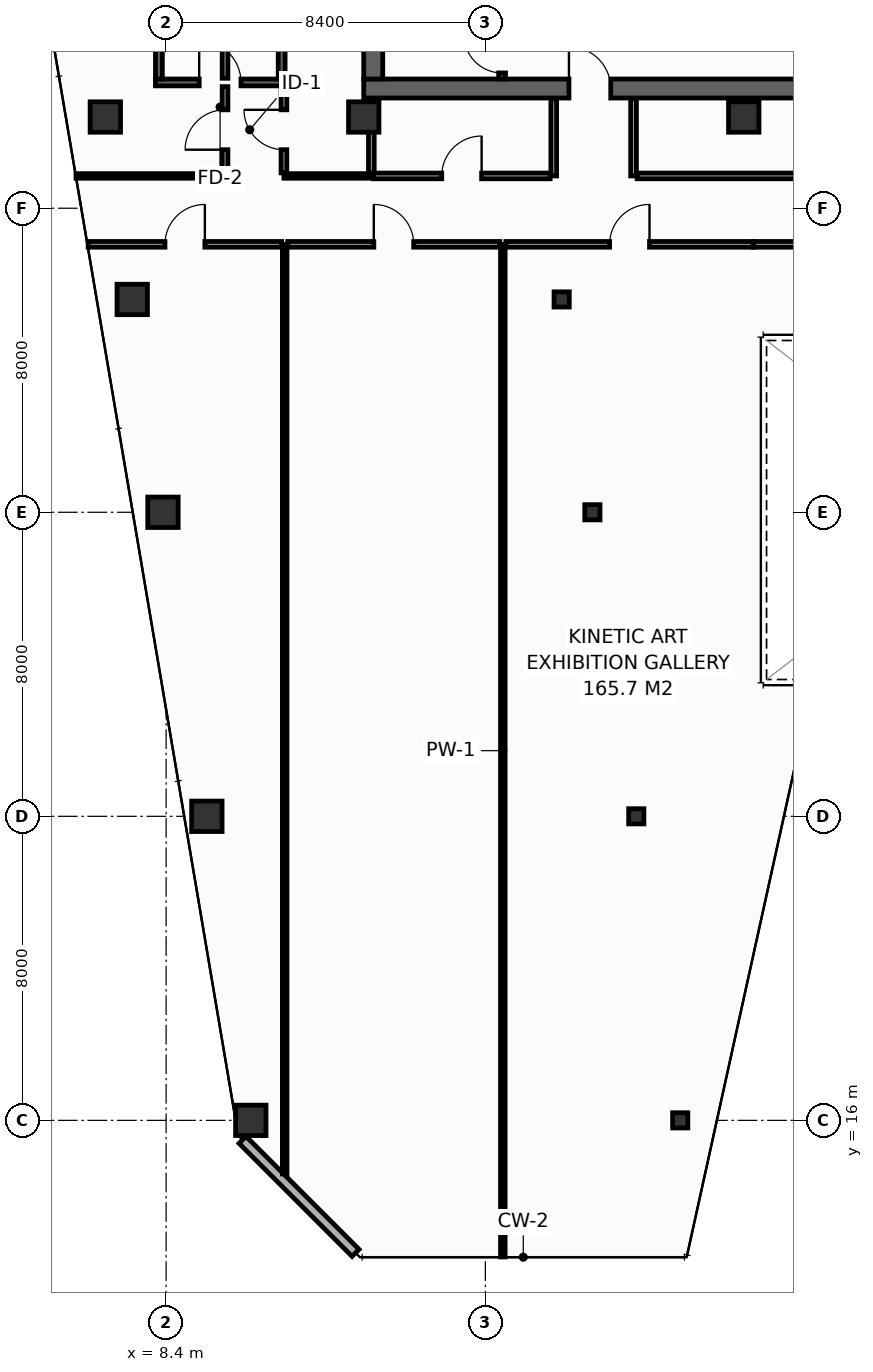
"""IFC4 building model, lengths in metres.
Left out: names, types, materials, properties, quantities, classifications, styles, units other than length and angle.
Written with IfcOpenShell. Run it as: python <this file> out.ifc"""

import sys

from ifc_helpers import new_model, si_unit, direction, frame, frame_2d, origin, origin_2d, place, context, subcontext, project, spatial, rectangle, hollow_rectangle, extrude, element, fill, save


model = new_model("IFC4")
c1 = context("Model", 3, precision=1e-05, world=origin(), true_north=direction((0.0, 1.0)))
c2 = subcontext(c1, "Body", "Model", "MODEL_VIEW")
j1 = project(units=[si_unit("LENGTHUNIT", "METRE"), si_unit("PLANEANGLEUNIT", "RADIAN")], contexts=[c1])
p1 = place(None, origin())
s1 = spatial("IfcSite", under=j1, at=p1, CompositionType="ELEMENT")
p2 = place(p1, origin())
s2 = spatial("IfcBuilding", under=s1, at=p2, CompositionType="ELEMENT")
p3 = place(p2, frame((0.0, 0.0, 205.6)))
s3 = spatial("IfcBuildingStorey", under=s2, at=p3, CompositionType="ELEMENT", Elevation=205.6)
p4 = place(p3, frame((13.6, 43.15, 0.0), z_axis=(0.0, 0.0, 1.0), x_axis=(1.0, 0.0, 0.0)))
e1 = element("IfcWall", 1, at=p4, inside=s3, PredefinedType="SHEAR", context=c2, shape_type="SweptSolid", body=[
    extrude(rectangle(XDim=32.7, YDim=0.5, at=frame_2d((16.35, 0.0))), origin(), (0.0, 0.0, 1.0), 3.55),
])
p5 = place(p4, frame((5.4, 0.0, 0.0)))
e2 = element("IfcOpeningElement", 2, at=p5, cuts=e1, PredefinedType="OPENING", context=c2, shape_type="SweptSolid", body=[
    extrude(rectangle(XDim=1.1, YDim=2.15, at=frame_2d((0.55, 1.075))), frame((0.0, 0.26, 0.0), z_axis=(0.0, -1.0, 0.0), x_axis=(1.0, 0.0, 0.0)), (0.0, 0.0, 1.0), 0.52),
])
p6 = place(p4, frame((25.6, 0.0, 0.0)))
e3 = element("IfcOpeningElement", 3, at=p6, cuts=e1, PredefinedType="OPENING", context=c2, shape_type="SweptSolid", body=[
    extrude(rectangle(XDim=1.1, YDim=2.15, at=frame_2d((0.55, 1.075))), frame((0.0, 0.26, 0.0), z_axis=(0.0, -1.0, 0.0), x_axis=(1.0, 0.0, 0.0)), (0.0, 0.0, 1.0), 0.52),
])
p7 = place(p3, frame((13.85, 43.4, 0.0), z_axis=(0.0, 0.0, 1.0), x_axis=(0.0, 1.0, 0.0)))
e4 = element("IfcWall", 4, at=p7, inside=s3, PredefinedType="SHEAR", context=c2, shape_type="SweptSolid", body=[
    extrude(rectangle(XDim=10.4, YDim=0.5, at=frame_2d((5.2, 0.0))), origin(), (0.0, 0.0, 1.0), 3.55),
])
for number, where, z_axis, x_axis in (
    (5, (6.8, 42.4, 0.0), (0.0, 0.0, 1.0), (1.0, 0.0, 0.0)),
    (6, (13.6, 42.4, 0.0), (0.0, 0.0, 1.0), (1.0, 0.0, 0.0)),
    (7, (23.6, 42.4, 0.0), (0.0, 0.0, 1.0), (1.0, 0.0, 0.0)),
    (8, (10.628, 16.0, 0.0), (0.0, 0.0, 1.0), (1.0, 0.0, 0.0)),
):
    element("IfcColumn", number, at=place(p3, frame(where, z_axis=z_axis, x_axis=x_axis)), inside=s3, PredefinedType="COLUMN", context=c2, shape_type="SweptSolid", body=[
        extrude(hollow_rectangle(XDim=0.8, YDim=0.8, WallThickness=0.036, at=origin_2d()), origin(), (0.0, 0.0, 1.0), 3.8),
    ])
p8 = place(p3, frame((21.928, 16.0, 0.0), z_axis=(0.0, 0.0, 1.0), x_axis=(1.0, 0.0, 0.0)))
e9 = element("IfcColumn", 9, at=p8, inside=s3, PredefinedType="COLUMN", context=c2, shape_type="SweptSolid", body=[
    extrude(hollow_rectangle(XDim=0.4, YDim=0.4, WallThickness=0.016, at=origin_2d()), origin(), (0.0, 0.0, 1.0), 3.8),
])
p9 = place(p3, frame((9.472, 24.0, 0.0), z_axis=(0.0, 0.0, 1.0), x_axis=(1.0, 0.0, 0.0)))
e10 = element("IfcColumn", 10, at=p9, inside=s3, PredefinedType="COLUMN", context=c2, shape_type="SweptSolid", body=[
    extrude(hollow_rectangle(XDim=0.8, YDim=0.8, WallThickness=0.036, at=origin_2d()), origin(), (0.0, 0.0, 1.0), 3.8),
])
p10 = place(p3, frame((20.772, 24.0, 0.0), z_axis=(0.0, 0.0, 1.0), x_axis=(1.0, 0.0, 0.0)))
e11 = element("IfcColumn", 11, at=p10, inside=s3, PredefinedType="COLUMN", context=c2, shape_type="SweptSolid", body=[
    extrude(hollow_rectangle(XDim=0.4, YDim=0.4, WallThickness=0.016, at=origin_2d()), origin(), (0.0, 0.0, 1.0), 3.8),
])
p11 = place(p3, frame((8.317, 32.0, 0.0), z_axis=(0.0, 0.0, 1.0), x_axis=(1.0, 0.0, 0.0)))
e12 = element("IfcColumn", 12, at=p11, inside=s3, PredefinedType="COLUMN", context=c2, shape_type="SweptSolid", body=[
    extrude(hollow_rectangle(XDim=0.8, YDim=0.8, WallThickness=0.036, at=origin_2d()), origin(), (0.0, 0.0, 1.0), 3.8),
])
p12 = place(p3, frame((19.617, 32.0, 0.0), z_axis=(0.0, 0.0, 1.0), x_axis=(1.0, 0.0, 0.0)))
e13 = element("IfcColumn", 13, at=p12, inside=s3, PredefinedType="COLUMN", context=c2, shape_type="SweptSolid", body=[
    extrude(hollow_rectangle(XDim=0.4, YDim=0.4, WallThickness=0.016, at=origin_2d()), origin(), (0.0, 0.0, 1.0), 3.8),
])
p13 = place(p3, frame((7.508, 37.6, 0.0), z_axis=(0.0, 0.0, 1.0), x_axis=(1.0, 0.0, 0.0)))
e14 = element("IfcColumn", 14, at=p13, inside=s3, PredefinedType="COLUMN", context=c2, shape_type="SweptSolid", body=[
    extrude(hollow_rectangle(XDim=0.8, YDim=0.8, WallThickness=0.036, at=origin_2d()), origin(), (0.0, 0.0, 1.0), 3.8),
])
p14 = place(p3, frame((18.808, 37.6, 0.0), z_axis=(0.0, 0.0, 1.0), x_axis=(1.0, 0.0, 0.0)))
e15 = element("IfcColumn", 15, at=p14, inside=s3, PredefinedType="COLUMN", context=c2, shape_type="SweptSolid", body=[
    extrude(hollow_rectangle(XDim=0.4, YDim=0.4, WallThickness=0.016, at=origin_2d()), origin(), (0.0, 0.0, 1.0), 3.8),
])
p15 = place(p3, frame((17.24, 43.4, 0.0), z_axis=(0.0, 0.0, 1.0), x_axis=(0.0, 1.0, 0.0)))
e16 = element("IfcWall", 16, at=p15, inside=s3, PredefinedType="SHEAR", context=c2, shape_type="SweptSolid", body=[
    extrude(rectangle(XDim=10.4, YDim=0.18, at=frame_2d((5.2, 0.0))), origin(), (0.0, 0.0, 1.0), 3.55),
])
p16 = place(p15, frame((0.16, 0.0, 0.0)))
e17 = element("IfcOpeningElement", 17, at=p16, cuts=e16, PredefinedType="OPENING", context=c2, shape_type="SweptSolid", body=[
    extrude(rectangle(XDim=1.0, YDim=2.15, at=frame_2d((0.5, 1.075))), frame((0.0, 0.1, 0.0), z_axis=(0.0, -1.0, 0.0), x_axis=(1.0, 0.0, 0.0)), (0.0, 0.0, 1.0), 0.2),
])
p17 = place(p3, frame((8.12, 43.31, 0.0), z_axis=(0.0, 0.0, 1.0), x_axis=(1.0, 0.0, 0.0)))
e18 = element("IfcWall", 18, at=p17, inside=s3, PredefinedType="SHEAR", context=c2, shape_type="SweptSolid", body=[
    extrude(rectangle(XDim=3.41, YDim=0.18, at=frame_2d((1.705, 0.0))), origin(), (0.0, 0.0, 1.0), 3.55),
])
p18 = place(p17, frame((1.15, 0.0, 0.0)))
e19 = element("IfcOpeningElement", 19, at=p18, cuts=e18, PredefinedType="OPENING", context=c2, shape_type="SweptSolid", body=[
    extrude(rectangle(XDim=1.1, YDim=2.15, at=frame_2d((0.55, 1.075))), frame((0.0, 0.1, 0.0), z_axis=(0.0, -1.0, 0.0), x_axis=(1.0, 0.0, 0.0)), (0.0, 0.0, 1.0), 0.2),
])
for number, where, z_axis, x_axis in (
    (20, (11.44, 43.4, 0.0), (0.0, 0.0, 1.0), (0.0, 1.0, 0.0)),
    (21, (8.21, 53.8, 0.0), (0.0, 0.0, 1.0), (0.0, -1.0, 0.0)),
):
    element("IfcWall", number, at=place(p3, frame(where, z_axis=z_axis, x_axis=x_axis)), inside=s3, PredefinedType="SHEAR", context=c2, shape_type="SweptSolid", body=[
        extrude(rectangle(XDim=10.4, YDim=0.18, at=frame_2d((5.2, 0.0))), origin(), (0.0, 0.0, 1.0), 3.55),
    ])
p19 = place(p3, frame((10.411, 15.487, 0.0), z_axis=(0.0, 0.0, 1.0), x_axis=(0.707135806771, -0.70707775441, 0.0)))
e22 = element("IfcWall", 22, at=p19, inside=s3, PredefinedType="STANDARD", context=c2, shape_type="SweptSolid", body=[
    extrude(rectangle(XDim=4.206, YDim=0.26, at=frame_2d((2.103, 0.0))), origin(), (0.0, 0.0, 1.0), 3.55),
])
p20 = place(p3, frame((6.028, 40.85, 0.0), z_axis=(0.0, 0.0, 1.0), x_axis=(1.0, 0.0, 0.0)))
e23 = element("IfcWall", 23, at=p20, inside=s3, PredefinedType="PARTITIONING", context=c2, shape_type="SweptSolid", body=[
    extrude(rectangle(XDim=3.922, YDim=0.12, at=frame_2d((1.961, 0.0))), origin(), (0.0, 0.0, 1.0), 3.035),
])
p21 = place(p3, frame((11.5, 40.85, 0.0), z_axis=(0.0, 0.0, 1.0), x_axis=(1.0, 0.0, 0.0)))
e24 = element("IfcWall", 24, at=p21, inside=s3, PredefinedType="PARTITIONING", context=c2, shape_type="SweptSolid", body=[
    extrude(rectangle(XDim=2.35, YDim=0.12, at=frame_2d((1.175, 0.0))), origin(), (0.0, 0.0, 1.0), 3.55),
])
p22 = place(p3, frame((9.95, 40.93, 0.0), z_axis=(0.0, 0.0, 1.0), x_axis=(0.0, 1.0, 0.0)))
e25 = element("IfcWall", 25, at=p22, inside=s3, PredefinedType="PARTITIONING", context=c2, shape_type="SweptSolid", body=[
    extrude(rectangle(XDim=2.27, YDim=0.15, at=frame_2d((1.135, 0.0))), origin(), (0.0, 0.0, 1.0), 2.835),
])
p23 = place(p22, frame((0.61, 0.0, 0.0)))
e26 = element("IfcOpeningElement", 26, at=p23, cuts=e25, PredefinedType="OPENING", context=c2, shape_type="SweptSolid", body=[
    extrude(rectangle(XDim=1.05, YDim=2.15, at=frame_2d((0.525, 1.075))), frame((0.0, 0.085, 0.0), z_axis=(0.0, -1.0, 0.0), x_axis=(1.0, 0.0, 0.0)), (0.0, 0.0, 1.0), 0.17),
])
p24 = place(p3, frame((9.95, 43.42, 0.0), z_axis=(0.0, 0.0, 1.0), x_axis=(0.0, 1.0, 0.0)))
e27 = element("IfcWall", 27, at=p24, inside=s3, PredefinedType="PARTITIONING", context=c2, shape_type="SweptSolid", body=[
    extrude(rectangle(XDim=1.45, YDim=0.15, at=frame_2d((0.725, 0.0))), origin(), (0.0, 0.0, 1.0), 3.55),
])
p25 = place(p3, frame((11.5, 40.93, 0.0), z_axis=(0.0, 0.0, 1.0), x_axis=(0.0, 1.0, 0.0)))
e28 = element("IfcWall", 28, at=p25, inside=s3, PredefinedType="PARTITIONING", context=c2, shape_type="SweptSolid", body=[
    extrude(rectangle(XDim=2.27, YDim=0.15, at=frame_2d((1.135, 0.0))), origin(), (0.0, 0.0, 1.0), 2.835),
])
p26 = place(p25, frame((0.61, 0.0, 0.0)))
e29 = element("IfcOpeningElement", 29, at=p26, cuts=e28, PredefinedType="OPENING", context=c2, shape_type="SweptSolid", body=[
    extrude(rectangle(XDim=1.05, YDim=2.15, at=frame_2d((0.525, 1.075))), frame((0.0, 0.085, 0.0), z_axis=(0.0, -1.0, 0.0), x_axis=(1.0, 0.0, 0.0)), (0.0, 0.0, 1.0), 0.17),
])
p27 = place(p3, frame((13.8, 40.93, 0.0), z_axis=(0.0, 0.0, 1.0), x_axis=(0.0, 1.0, 0.0)))
e30 = element("IfcWall", 30, at=p27, inside=s3, PredefinedType="PARTITIONING", context=c2, shape_type="SweptSolid", body=[
    extrude(rectangle(XDim=1.95, YDim=0.15, at=frame_2d((0.975, 0.0))), origin(), (0.0, 0.0, 1.0), 3.55),
])
for number, where, z_axis, x_axis in (
    (31, (18.6, 40.85, 0.0), (0.0, 0.0, 1.0), (0.0, 1.0, 0.0)),
    (32, (20.7, 40.85, 0.0), (0.0, 0.0, 1.0), (0.0, 1.0, 0.0)),
):
    element("IfcWall", number, at=place(p3, frame(where, z_axis=z_axis, x_axis=x_axis)), inside=s3, PredefinedType="PARTITIONING", context=c2, shape_type="SweptSolid", body=[
        extrude(rectangle(XDim=2.03, YDim=0.15, at=frame_2d((1.015, 0.0))), origin(), (0.0, 0.0, 1.0), 3.55),
    ])
p28 = place(p3, frame((13.85, 40.85, 0.0), z_axis=(0.0, 0.0, 1.0), x_axis=(1.0, 0.0, 0.0)))
e33 = element("IfcWall", 33, at=p28, inside=s3, PredefinedType="PARTITIONING", context=c2, shape_type="SweptSolid", body=[
    extrude(rectangle(XDim=4.655, YDim=0.15, at=frame_2d((2.327, 0.0))), origin(), (0.0, 0.0, 1.0), 3.55),
])
p29 = place(p28, frame((1.802, 0.0, 0.0)))
e34 = element("IfcOpeningElement", 34, at=p29, cuts=e33, PredefinedType="OPENING", context=c2, shape_type="SweptSolid", body=[
    extrude(rectangle(XDim=1.05, YDim=2.15, at=frame_2d((0.525, 1.075))), frame((0.0, 0.085, 0.0), z_axis=(0.0, -1.0, 0.0), x_axis=(1.0, 0.0, 0.0)), (0.0, 0.0, 1.0), 0.17),
])
p30 = place(p3, frame((20.795, 40.85, 0.0), z_axis=(0.0, 0.0, 1.0), x_axis=(1.0, 0.0, 0.0)))
e35 = element("IfcWall", 35, at=p30, inside=s3, PredefinedType="PARTITIONING", context=c2, shape_type="SweptSolid", body=[
    extrude(rectangle(XDim=12.125, YDim=0.15, at=frame_2d((6.062, 0.0))), origin(), (0.0, 0.0, 1.0), 2.835),
])
p31 = place(p30, frame((5.537, 0.0, 0.0)))
e36 = element("IfcOpeningElement", 36, at=p31, cuts=e35, PredefinedType="OPENING", context=c2, shape_type="SweptSolid", body=[
    extrude(rectangle(XDim=1.05, YDim=2.15, at=frame_2d((0.525, 1.075))), frame((0.0, 0.085, 0.0), z_axis=(0.0, -1.0, 0.0), x_axis=(1.0, 0.0, 0.0)), (0.0, 0.0, 1.0), 0.17),
])
p32 = place(p3, frame((11.52, 14.59, 0.0), z_axis=(0.0, 0.0, 1.0), x_axis=(0.0, 1.0, 0.0)))
e37 = element("IfcWall", 37, at=p32, inside=s3, PredefinedType="PARTITIONING", context=c2, shape_type="SweptSolid", body=[
    extrude(rectangle(XDim=24.46, YDim=0.12, at=frame_2d((12.23, 0.0))), origin(), (0.0, 0.0, 1.0), 2.835),
])
p33 = place(p3, frame((17.26, 12.405, 0.0), z_axis=(0.0, 0.0, 1.0), x_axis=(0.0, 1.0, 0.0)))
e38 = element("IfcWall", 38, at=p33, inside=s3, PredefinedType="PARTITIONING", context=c2, shape_type="SweptSolid", body=[
    extrude(rectangle(XDim=26.645, YDim=0.12, at=frame_2d((13.323, 0.0))), origin(), (0.0, 0.0, 1.0), 2.835),
])
p34 = place(p3, frame((6.348, 39.05, 0.0), z_axis=(0.0, 0.0, 1.0), x_axis=(1.0, 0.0, 0.0)))
e39 = element("IfcWall", 39, at=p34, inside=s3, PredefinedType="PARTITIONING", context=c2, shape_type="SweptSolid", body=[
    extrude(rectangle(XDim=5.092, YDim=0.15, at=frame_2d((2.546, 0.0))), origin(), (0.0, 0.0, 1.0), 3.035),
])
p35 = place(p34, frame((2.021, 0.0, 0.0)))
e40 = element("IfcOpeningElement", 40, at=p35, cuts=e39, PredefinedType="OPENING", context=c2, shape_type="SweptSolid", body=[
    extrude(rectangle(XDim=1.05, YDim=2.15, at=frame_2d((0.525, 1.075))), frame((0.0, 0.085, 0.0), z_axis=(0.0, -1.0, 0.0), x_axis=(1.0, 0.0, 0.0)), (0.0, 0.0, 1.0), 0.17),
])
p36 = place(p3, frame((11.6, 39.05, 0.0), z_axis=(0.0, 0.0, 1.0), x_axis=(1.0, 0.0, 0.0)))
e41 = element("IfcWall", 41, at=p36, inside=s3, PredefinedType="PARTITIONING", context=c2, shape_type="SweptSolid", body=[
    extrude(rectangle(XDim=5.58, YDim=0.15, at=frame_2d((2.79, 0.0))), origin(), (0.0, 0.0, 1.0), 3.55),
])
p37 = place(p36, frame((2.265, 0.0, 0.0)))
e42 = element("IfcOpeningElement", 42, at=p37, cuts=e41, PredefinedType="OPENING", context=c2, shape_type="SweptSolid", body=[
    extrude(rectangle(XDim=1.05, YDim=2.15, at=frame_2d((0.525, 1.075))), frame((0.0, 0.085, 0.0), z_axis=(0.0, -1.0, 0.0), x_axis=(1.0, 0.0, 0.0)), (0.0, 0.0, 1.0), 0.17),
])
p38 = place(p3, frame((17.34, 39.05, 0.0), z_axis=(0.0, 0.0, 1.0), x_axis=(1.0, 0.0, 0.0)))
e43 = element("IfcWall", 43, at=p38, inside=s3, PredefinedType="PARTITIONING", context=c2, shape_type="SweptSolid", body=[
    extrude(rectangle(XDim=6.51, YDim=0.15, at=frame_2d((3.255, 0.0))), origin(), (0.0, 0.0, 1.0), 2.835),
])
p39 = place(p38, frame((2.73, 0.0, 0.0)))
e44 = element("IfcOpeningElement", 44, at=p39, cuts=e43, PredefinedType="OPENING", context=c2, shape_type="SweptSolid", body=[
    extrude(rectangle(XDim=1.05, YDim=2.15, at=frame_2d((0.525, 1.075))), frame((0.0, 0.085, 0.0), z_axis=(0.0, -1.0, 0.0), x_axis=(1.0, 0.0, 0.0)), (0.0, 0.0, 1.0), 0.17),
])
p40 = place(p3, frame((23.85, 39.05, 0.0), z_axis=(0.0, 0.0, 1.0), x_axis=(1.0, 0.0, 0.0)))
e45 = element("IfcWall", 45, at=p40, inside=s3, PredefinedType="PARTITIONING", context=c2, shape_type="SweptSolid", body=[
    extrude(rectangle(XDim=12.3, YDim=0.15, at=frame_2d((6.15, 0.0))), origin(), (0.0, 0.0, 1.0), 3.55),
])
p41 = place(p16, origin())
e46 = element("IfcDoor", 46, at=p41, inside=s3, OperationType="SINGLE_SWING_RIGHT", PredefinedType="DOOR", context=c2, shape_type="SweptSolid", body=[
    extrude(rectangle(XDim=1.0, YDim=2.15, at=frame_2d((0.5, 1.075))), frame((0.0, 0.025, 0.0), z_axis=(0.0, -1.0, 0.0), x_axis=(1.0, 0.0, 0.0)), (0.0, 0.0, 1.0), 0.05),
])
fill(e17, e46)
p42 = place(p18, origin())
e47 = element("IfcDoor", 47, at=p42, inside=s3, OperationType="SINGLE_SWING_LEFT", PredefinedType="DOOR", context=c2, shape_type="SweptSolid", body=[
    extrude(rectangle(XDim=1.1, YDim=2.15, at=frame_2d((0.55, 1.075))), frame((0.0, 0.025, 0.0), z_axis=(0.0, -1.0, 0.0), x_axis=(1.0, 0.0, 0.0)), (0.0, 0.0, 1.0), 0.05),
])
fill(e19, e47)
p43 = place(p5, origin())
e48 = element("IfcDoor", 48, at=p43, inside=s3, OperationType="SINGLE_SWING_LEFT", PredefinedType="DOOR", context=c2, shape_type="SweptSolid", body=[
    extrude(rectangle(XDim=1.1, YDim=2.15, at=frame_2d((0.55, 1.075))), frame((0.0, 0.025, 0.0), z_axis=(0.0, -1.0, 0.0), x_axis=(1.0, 0.0, 0.0)), (0.0, 0.0, 1.0), 0.05),
])
fill(e2, e48)
p44 = place(p23, origin())
e49 = element("IfcDoor", 49, at=p44, inside=s3, OperationType="SINGLE_SWING_LEFT", PredefinedType="DOOR", context=c2, shape_type="SweptSolid", body=[
    extrude(rectangle(XDim=1.05, YDim=2.15, at=frame_2d((0.525, 1.075))), frame((0.0, 0.025, 0.0), z_axis=(0.0, -1.0, 0.0), x_axis=(1.0, 0.0, 0.0)), (0.0, 0.0, 1.0), 0.05),
])
fill(e26, e49)
p45 = place(p26, origin())
e50 = element("IfcDoor", 50, at=p45, inside=s3, OperationType="SINGLE_SWING_RIGHT", PredefinedType="DOOR", context=c2, shape_type="SweptSolid", body=[
    extrude(rectangle(XDim=1.05, YDim=2.15, at=frame_2d((0.525, 1.075))), frame((0.0, 0.025, 0.0), z_axis=(0.0, -1.0, 0.0), x_axis=(1.0, 0.0, 0.0)), (0.0, 0.0, 1.0), 0.05),
])
fill(e29, e50)
p46 = place(p29, origin())
e51 = element("IfcDoor", 51, at=p46, inside=s3, OperationType="SINGLE_SWING_RIGHT", PredefinedType="DOOR", context=c2, shape_type="SweptSolid", body=[
    extrude(rectangle(XDim=1.05, YDim=2.15, at=frame_2d((0.525, 1.075))), frame((0.0, 0.025, 0.0), z_axis=(0.0, -1.0, 0.0), x_axis=(1.0, 0.0, 0.0)), (0.0, 0.0, 1.0), 0.05),
])
fill(e34, e51)
p47 = place(p35, origin())
e52 = element("IfcDoor", 52, at=p47, inside=s3, OperationType="SINGLE_SWING_RIGHT", PredefinedType="DOOR", context=c2, shape_type="SweptSolid", body=[
    extrude(rectangle(XDim=1.05, YDim=2.15, at=frame_2d((0.525, 1.075))), frame((0.0, 0.025, 0.0), z_axis=(0.0, -1.0, 0.0), x_axis=(1.0, 0.0, 0.0)), (0.0, 0.0, 1.0), 0.05),
])
fill(e40, e52)
p48 = place(p37, origin())
e53 = element("IfcDoor", 53, at=p48, inside=s3, OperationType="SINGLE_SWING_LEFT", PredefinedType="DOOR", context=c2, shape_type="SweptSolid", body=[
    extrude(rectangle(XDim=1.05, YDim=2.15, at=frame_2d((0.525, 1.075))), frame((0.0, 0.025, 0.0), z_axis=(0.0, -1.0, 0.0), x_axis=(1.0, 0.0, 0.0)), (0.0, 0.0, 1.0), 0.05),
])
fill(e42, e53)
p49 = place(p39, origin())
e54 = element("IfcDoor", 54, at=p49, inside=s3, OperationType="SINGLE_SWING_RIGHT", PredefinedType="DOOR", context=c2, shape_type="SweptSolid", body=[
    extrude(rectangle(XDim=1.05, YDim=2.15, at=frame_2d((0.525, 1.075))), frame((0.0, 0.025, 0.0), z_axis=(0.0, -1.0, 0.0), x_axis=(1.0, 0.0, 0.0)), (0.0, 0.0, 1.0), 0.05),
])
fill(e44, e54)
save(model, sys.argv[1])
